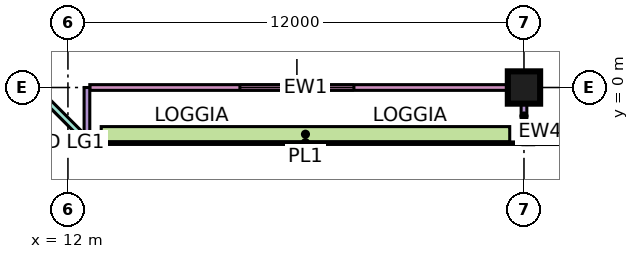
"""IFC4 building model, lengths in metres.
Left out: names, types, materials, properties, quantities, classifications, styles, units other than length and angle.
Written with IfcOpenShell. Run it as: python <this file> out.ifc"""

import sys

from ifc_helpers import new_model, si_unit, direction, frame, frame_2d, origin, origin_2d, place, context, subcontext, project, spatial, rectangle, extrude, element, fill, save


model = new_model("IFC4")
c1 = context("Model", 3, precision=1e-05, world=origin(), true_north=direction((0.0, 1.0)))
c2 = subcontext(c1, "Body", "Model", "MODEL_VIEW")
j1 = project(units=[si_unit("LENGTHUNIT", "METRE"), si_unit("PLANEANGLEUNIT", "RADIAN")], contexts=[c1])
p1 = place(None, origin())
s1 = spatial("IfcSite", under=j1, at=p1, CompositionType="ELEMENT")
p2 = place(p1, origin())
s2 = spatial("IfcBuilding", under=s1, at=p2, CompositionType="ELEMENT")
p3 = place(p2, frame((0.0, 0.0, 262.15)))
s3 = spatial("IfcBuildingStorey", under=s2, at=p3, CompositionType="ELEMENT", Elevation=262.15)
p4 = place(p3, frame((24.0, 0.0, 0.0), z_axis=(0.0, 0.0, 1.0), x_axis=(1.0, 0.0, 0.0)))
e1 = element("IfcColumn", 1, at=p4, inside=s3, PredefinedType="COLUMN", context=c2, shape_type="SweptSolid", body=[
    extrude(rectangle(XDim=0.85, YDim=0.85, at=origin_2d()), origin(), (0.0, 0.0, 1.0), 11.25),
])
p5 = place(p3, frame((-1.447, 12.553, 0.0), z_axis=(0.0, 0.0, 1.0), x_axis=(0.707106781187, -0.707106781187, 0.0)))
e2 = element("IfcWall", 2, at=p5, inside=s3, PredefinedType="SOLIDWALL", context=c2, shape_type="SweptSolid", body=[
    extrude(rectangle(XDim=19.799, YDim=0.15, at=frame_2d((9.899, 0.0))), origin(), (0.0, 0.0, 1.0), 10.85),
])
p6 = place(p5, frame((8.399, 0.0, 0.45)))
e3 = element("IfcOpeningElement", 3, at=p6, cuts=e2, PredefinedType="OPENING", context=c2, shape_type="SweptSolid", body=[
    extrude(rectangle(XDim=3.0, YDim=9.8, at=frame_2d((1.5, 4.9))), frame((0.0, 0.085, 0.0), z_axis=(0.0, -1.0, 0.0), x_axis=(1.0, 0.0, 0.0)), (0.0, 0.0, 1.0), 0.17),
])
p7 = place(p3, frame((12.575, 0.0, 0.0), z_axis=(0.0, 0.0, 1.0), x_axis=(1.0, 0.0, 0.0)))
e4 = element("IfcWall", 4, at=p7, inside=s3, PredefinedType="SOLIDWALL", context=c2, shape_type="SweptSolid", body=[
    extrude(rectangle(XDim=11.35, YDim=0.15, at=frame_2d((5.675, 0.0))), origin(), (0.0, 0.0, 1.0), 10.85),
])
p8 = place(p7, frame((3.95, 0.0, 0.45)))
e5 = element("IfcOpeningElement", 5, at=p8, cuts=e4, PredefinedType="OPENING", context=c2, shape_type="SweptSolid", body=[
    extrude(rectangle(XDim=3.0, YDim=9.8, at=frame_2d((1.5, 4.9))), frame((0.0, 0.085, 0.0), z_axis=(0.0, -1.0, 0.0), x_axis=(1.0, 0.0, 0.0)), (0.0, 0.0, 1.0), 0.17),
])
for number, where, z_axis, x_axis in (
    (6, (12.5, -1.5, 0.0), (0.0, 0.0, 1.0), (0.0, 1.0, 0.0)),
    (7, (24.0, -1.5, 0.0), (0.0, 0.0, 1.0), (0.0, 1.0, 0.0)),
):
    element("IfcWall", number, at=place(p3, frame(where, z_axis=z_axis, x_axis=x_axis)), inside=s3, PredefinedType="SOLIDWALL", context=c2, shape_type="SweptSolid", body=[
        extrude(rectangle(XDim=1.5, YDim=0.15, at=frame_2d((0.75, 0.0))), origin(), (0.0, 0.0, 1.0), 10.85),
    ])
p9 = place(p3, frame((12.875, -1.229, 0.0), z_axis=(0.0, 0.0, 1.0), x_axis=(1.0, 0.0, 0.0)))
e8 = element("IfcWall", 8, at=p9, inside=s3, PredefinedType="SOLIDWALL", context=c2, shape_type="SweptSolid", body=[
    extrude(rectangle(XDim=10.75, YDim=0.4, at=frame_2d((5.375, 0.0))), origin(), (0.0, 0.0, 1.0), 0.7),
])
p10 = place(p8, origin())
e9 = element("IfcWindow", 9, at=p10, inside=s3, PartitioningType="SINGLE_PANEL", PredefinedType="WINDOW", context=c2, shape_type="SweptSolid", body=[
    extrude(rectangle(XDim=3.0, YDim=9.8, at=frame_2d((1.5, 4.9))), frame((0.0, 0.03, 0.0), z_axis=(0.0, -1.0, 0.0), x_axis=(1.0, 0.0, 0.0)), (0.0, 0.0, 1.0), 0.06),
])
fill(e5, e9)
save(model, sys.argv[1])
